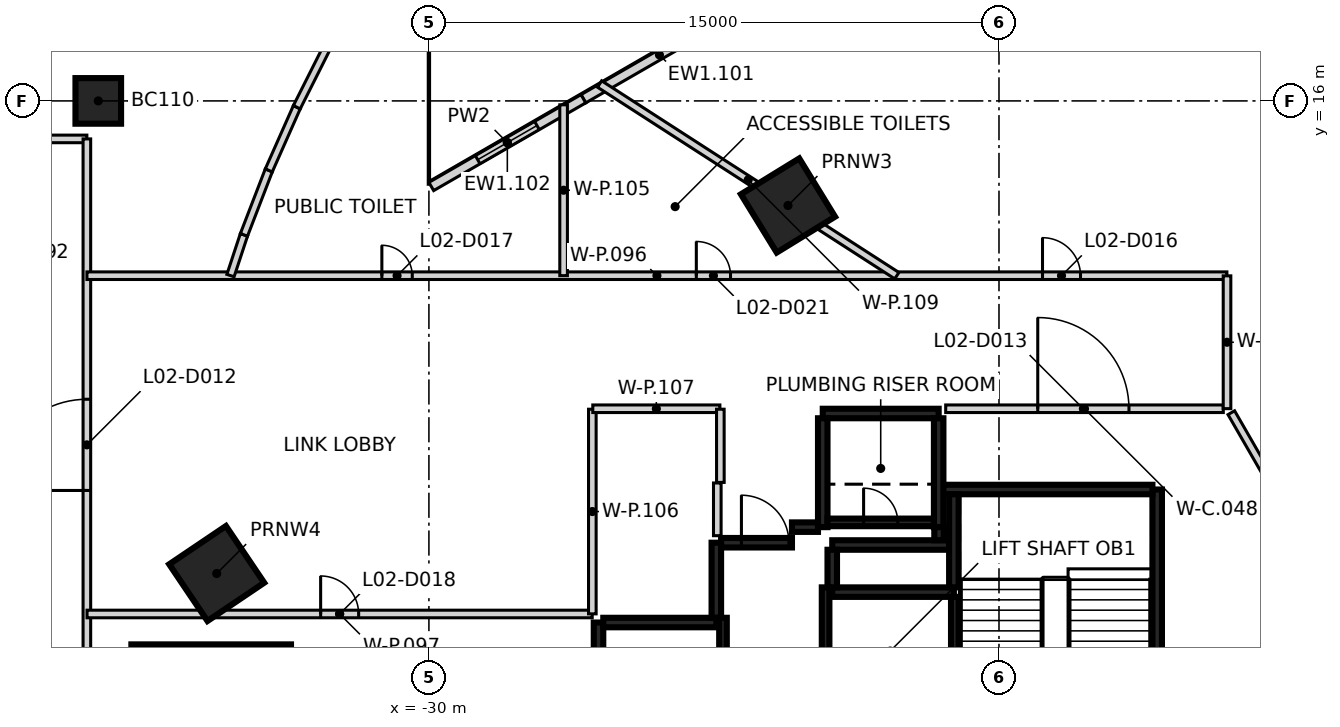
"""IFC4 building model, lengths in metres.
Left out: names, types, materials, properties, quantities, classifications, styles, units other than length and angle.
Written with IfcOpenShell. Run it as: python <this file> out.ifc"""

import sys

from ifc_helpers import new_model, si_unit, direction, frame, frame_2d, origin, origin_2d, place, context, subcontext, project, spatial, rectangle, extrude, element, fill, save


model = new_model("IFC4")
c1 = context("Model", 3, precision=1e-05, world=origin(), true_north=direction((0.0, 1.0)))
c2 = subcontext(c1, "Body", "Model", "MODEL_VIEW")
j1 = project(units=[si_unit("LENGTHUNIT", "METRE"), si_unit("PLANEANGLEUNIT", "RADIAN")], contexts=[c1])
p1 = place(None, origin())
s1 = spatial("IfcSite", under=j1, at=p1, CompositionType="ELEMENT")
p2 = place(p1, origin())
s2 = spatial("IfcBuilding", under=s1, at=p2, CompositionType="ELEMENT")
p3 = place(p2, frame((0.0, 0.0, 14.0)))
s3 = spatial("IfcBuildingStorey", under=s2, at=p3, CompositionType="ELEMENT", Elevation=14.0)
p4 = place(p3, frame((-35.729, 0.0, -0.35), z_axis=(0.0, 0.0, 1.0), x_axis=(1.0, 0.0, 0.0)))
e1 = element("IfcColumn", 1, at=p4, inside=s3, PredefinedType="COLUMN", context=c2, shape_type="SweptSolid", body=[
    extrude(rectangle(XDim=4.2, YDim=3.4, at=origin_2d()), origin(), (0.0, 0.0, 1.0), 5.5),
])
for number, where, z_axis, x_axis in (
    (2, (-20.552, 13.248, -0.35), (0.0, 0.0, 1.0), (-0.523, 0.852, 0.0)),
    (3, (-35.583, 3.565, -0.35), (0.0, 0.0, 1.0), (-0.559, 0.829, 0.0)),
):
    element("IfcColumn", number, at=place(p3, frame(where, z_axis=z_axis, x_axis=x_axis)), inside=s3, PredefinedType="COLUMN", context=c2, shape_type="SweptSolid", body=[
        extrude(rectangle(XDim=1.8, YDim=1.8, at=origin_2d()), origin(), (0.0, 0.0, 1.0), 3.1),
    ])
p5 = place(p3, frame((-38.7, 16.0, -0.35), z_axis=(0.0, 0.0, 1.0), x_axis=(1.0, 0.0, 0.0)))
e4 = element("IfcColumn", 4, at=p5, inside=s3, PredefinedType="COLUMN", context=c2, shape_type="SweptSolid", body=[
    extrude(rectangle(XDim=1.2, YDim=1.2, at=origin_2d()), origin(), (0.0, 0.0, 1.0), 5.5),
])
p6 = place(p3, frame((-25.936, 16.057, 0.0), z_axis=(0.0, 0.0, 1.0), x_axis=(0.866216377649, 0.499669077583, 0.0)))
e5 = element("IfcWall", 5, at=p6, inside=s3, PredefinedType="SOLIDWALL", context=c2, shape_type="SweptSolid", body=[
    extrude(rectangle(XDim=4.62, YDim=0.25, at=frame_2d((2.31, 0.0))), origin(), (0.0, 0.0, 1.0), 5.15),
])
p7 = place(p3, frame((-29.938, 13.748, 0.0), z_axis=(0.0, 0.0, 1.0), x_axis=(0.866193503994, 0.4997087288, 0.0)))
e6 = element("IfcWall", 6, at=p7, inside=s3, PredefinedType="SOLIDWALL", context=c2, shape_type="SweptSolid", body=[
    extrude(rectangle(XDim=4.62, YDim=0.25, at=frame_2d((2.31, 0.0))), origin(), (0.0, 0.0, 1.0), 5.15),
])
p8 = place(p7, frame((1.41, 0.0, 1.1)))
e7 = element("IfcOpeningElement", 7, at=p8, cuts=e6, PredefinedType="OPENING", context=c2, shape_type="SweptSolid", body=[
    extrude(rectangle(XDim=1.8, YDim=1.5, at=frame_2d((0.9, 0.75))), frame((0.0, 0.135, 0.0), z_axis=(0.0, -1.0, 0.0), x_axis=(1.0, 0.0, 0.0)), (0.0, 0.0, 1.0), 0.27),
])
p9 = place(p3, frame((-10.837, 5.775, 0.0), z_axis=(0.0, 0.0, 1.0), x_axis=(0.0, -1.0, 0.0)))
e8 = element("IfcWall", 8, at=p9, inside=s3, PredefinedType="SHEAR", context=c2, shape_type="SweptSolid", body=[
    extrude(rectangle(XDim=11.55, YDim=0.25, at=frame_2d((5.775, 0.0))), origin(), (0.0, 0.0, 1.0), 5.15),
])
p10 = place(p9, frame((10.025, 0.0, 0.0)))
e9 = element("IfcOpeningElement", 9, at=p10, cuts=e8, PredefinedType="OPENING", context=c2, shape_type="SweptSolid", body=[
    extrude(rectangle(XDim=1.2, YDim=2.1, at=frame_2d((0.6, 1.05))), frame((0.0, 0.135, 0.0), z_axis=(0.0, -1.0, 0.0), x_axis=(1.0, 0.0, 0.0)), (0.0, 0.0, 1.0), 0.27),
])
p11 = place(p9, frame((8.725, 0.0, 0.0)))
e10 = element("IfcOpeningElement", 10, at=p11, cuts=e8, PredefinedType="OPENING", context=c2, shape_type="SweptSolid", body=[
    extrude(rectangle(XDim=1.2, YDim=2.1, at=frame_2d((0.6, 1.05))), frame((0.0, 0.135, 0.0), z_axis=(0.0, -1.0, 0.0), x_axis=(1.0, 0.0, 0.0)), (0.0, 0.0, 1.0), 0.27),
])
p12 = place(p3, frame((-25.537, -3.575, 0.0), z_axis=(0.0, 0.0, 1.0), x_axis=(0.0, 1.0, 0.0)))
e11 = element("IfcWall", 11, at=p12, inside=s3, PredefinedType="SHEAR", context=c2, shape_type="SweptSolid", body=[
    extrude(rectangle(XDim=5.85, YDim=0.25, at=frame_2d((2.925, 0.0))), origin(), (0.0, 0.0, 1.0), 5.15),
])
p13 = place(p3, frame((-16.472, 5.775, 0.0), z_axis=(0.0, 0.0, 1.0), x_axis=(1.0, 0.0, 0.0)))
e12 = element("IfcWall", 12, at=p13, inside=s3, PredefinedType="SHEAR", context=c2, shape_type="SweptSolid", body=[
    extrude(rectangle(XDim=5.51, YDim=0.25, at=frame_2d((2.755, 0.0))), origin(), (0.0, 0.0, 1.0), 5.15),
])
p14 = place(p3, frame((-19.387, 3.075, 0.0), z_axis=(0.0, 0.0, 1.0), x_axis=(1.0, 0.0, 0.0)))
e13 = element("IfcWall", 13, at=p14, inside=s3, PredefinedType="SHEAR", context=c2, shape_type="SweptSolid", body=[
    extrude(rectangle(XDim=3.2, YDim=0.25, at=frame_2d((1.6, 0.0))), origin(), (0.0, 0.0, 1.0), 5.15),
])
p15 = place(p3, frame((-25.412, 2.275, 0.0), z_axis=(0.0, 0.0, 1.0), x_axis=(1.0, 0.0, 0.0)))
e14 = element("IfcWall", 14, at=p15, inside=s3, PredefinedType="SHEAR", context=c2, shape_type="SweptSolid", body=[
    extrude(rectangle(XDim=2.975, YDim=0.25, at=frame_2d((1.487, 0.0))), origin(), (0.0, 0.0, 1.0), 5.15),
])
p16 = place(p3, frame((-19.637, 7.775, 0.0), z_axis=(0.0, 0.0, 1.0), x_axis=(1.0, 0.0, 0.0)))
e15 = element("IfcWall", 15, at=p16, inside=s3, PredefinedType="SHEAR", context=c2, shape_type="SweptSolid", body=[
    extrude(rectangle(XDim=3.05, YDim=0.25, at=frame_2d((1.525, 0.0))), origin(), (0.0, 0.0, 1.0), 5.15),
])
for number, where, z_axis, x_axis in (
    (16, (-16.587, 7.65, 0.0), (0.0, 0.0, 1.0), (0.0, -1.0, 0.0)),
    (17, (-19.637, 4.785, 0.0), (0.0, 0.0, 1.0), (0.0, 1.0, 0.0)),
):
    element("IfcWall", number, at=place(p3, frame(where, z_axis=z_axis, x_axis=x_axis)), inside=s3, PredefinedType="SHEAR", context=c2, shape_type="SweptSolid", body=[
        extrude(rectangle(XDim=2.865, YDim=0.25, at=frame_2d((1.432, 0.0))), origin(), (0.0, 0.0, 1.0), 5.15),
    ])
p17 = place(p3, frame((-16.302, 4.315, 0.0), z_axis=(0.0, 0.0, 1.0), x_axis=(-1.0, 0.0, 0.0)))
e18 = element("IfcWall", 18, at=p17, inside=s3, PredefinedType="SHEAR", context=c2, shape_type="SweptSolid", body=[
    extrude(rectangle(XDim=3.085, YDim=0.25, at=frame_2d((1.542, 0.0))), origin(), (0.0, 0.0, 1.0), 5.15),
])
p18 = place(p3, frame((-16.187, 3.2, 0.0), z_axis=(0.0, 0.0, 1.0), x_axis=(0.0, 1.0, 0.0)))
e19 = element("IfcWall", 19, at=p18, inside=s3, PredefinedType="SHEAR", context=c2, shape_type="SweptSolid", body=[
    extrude(rectangle(XDim=2.449, YDim=0.25, at=frame_2d((1.225, 0.0))), origin(), (0.0, 0.0, 1.0), 5.15),
])
p19 = place(p3, frame((-22.437, 2.4, 0.0), z_axis=(0.0, 0.0, 1.0), x_axis=(0.0, 1.0, 0.0)))
e20 = element("IfcWall", 20, at=p19, inside=s3, PredefinedType="SHEAR", context=c2, shape_type="SweptSolid", body=[
    extrude(rectangle(XDim=1.975, YDim=0.25, at=frame_2d((0.987, 0.0))), origin(), (0.0, 0.0, 1.0), 5.15),
])
p20 = place(p3, frame((-22.312, 4.375, 0.0), z_axis=(0.0, 0.0, 1.0), x_axis=(1.0, 0.0, 0.0)))
e21 = element("IfcWall", 21, at=p20, inside=s3, PredefinedType="SHEAR", context=c2, shape_type="SweptSolid", body=[
    extrude(rectangle(XDim=1.865, YDim=0.25, at=frame_2d((0.932, 0.0))), origin(), (0.0, 0.0, 1.0), 5.15),
])
p21 = place(p20, frame((0.535, 0.0, 0.0)))
e22 = element("IfcOpeningElement", 22, at=p21, cuts=e21, PredefinedType="OPENING", context=c2, shape_type="SweptSolid", body=[
    extrude(rectangle(XDim=1.25, YDim=2.1, at=frame_2d((0.625, 1.05))), frame((0.0, 0.135, 0.0), z_axis=(0.0, -1.0, 0.0), x_axis=(1.0, 0.0, 0.0)), (0.0, 0.0, 1.0), 0.27),
])
p22 = place(p3, frame((-19.387, 4.19, 0.0), z_axis=(0.0, 0.0, 1.0), x_axis=(0.0, -1.0, 0.0)))
e23 = element("IfcWall", 23, at=p22, inside=s3, PredefinedType="SHEAR", context=c2, shape_type="SweptSolid", body=[
    extrude(rectangle(XDim=0.989, YDim=0.25, at=frame_2d((0.495, 0.0))), origin(), (0.0, 0.0, 1.0), 5.15),
])
p23 = place(p3, frame((-20.447, 4.785, 0.0), z_axis=(0.0, 0.0, 1.0), x_axis=(1.0, 0.0, 0.0)))
e24 = element("IfcWall", 24, at=p23, inside=s3, PredefinedType="SHEAR", context=c2, shape_type="SweptSolid", body=[
    extrude(rectangle(XDim=0.685, YDim=0.25, at=frame_2d((0.342, 0.0))), origin(), (0.0, 0.0, 1.0), 5.15),
])
p24 = place(p3, frame((-16.577, 4.785, 0.0), z_axis=(0.0, 0.0, 1.0), x_axis=(0.0, -1.0, 0.0)))
e25 = element("IfcWall", 25, at=p24, inside=s3, PredefinedType="SHEAR", context=c2, shape_type="SweptSolid", body=[
    extrude(rectangle(XDim=0.344, YDim=0.25, at=frame_2d((0.172, 0.0))), origin(), (0.0, 0.0, 1.0), 5.15),
])
p25 = place(p3, frame((-16.162, 2.951, 0.0), z_axis=(0.0, 0.0, 1.0), x_axis=(0.0, -1.0, 0.0)))
e26 = element("IfcWall", 26, at=p25, inside=s3, PredefinedType="SHEAR", context=c2, shape_type="SweptSolid", body=[
    extrude(rectangle(XDim=5.851, YDim=0.2, at=frame_2d((2.925, 0.0))), origin(), (0.0, 0.0, 1.0), 5.15),
])
for number, where, z_axis, x_axis in (
    (27, (-19.562, -2.9, 0.0), (0.0, 0.0, 1.0), (0.0, 1.0, 0.0)),
    (28, (-22.262, 2.4, 0.0), (0.0, 0.0, 1.0), (0.0, -1.0, 0.0)),
):
    element("IfcWall", number, at=place(p3, frame(where, z_axis=z_axis, x_axis=x_axis)), inside=s3, PredefinedType="SHEAR", context=c2, shape_type="SweptSolid", body=[
        extrude(rectangle(XDim=6.1, YDim=0.2, at=frame_2d((3.05, 0.0))), origin(), (0.0, 0.0, 1.0), 5.15),
    ])
p26 = place(p3, frame((-19.511, 4.91, 0.0), z_axis=(0.0, 0.0, 1.0), x_axis=(1.0, 0.0, 0.0)))
e29 = element("IfcWall", 29, at=p26, inside=s3, PredefinedType="SHEAR", context=c2, shape_type="SweptSolid", body=[
    extrude(rectangle(XDim=2.798, YDim=0.2, at=frame_2d((1.399, 0.0))), origin(), (0.0, 0.0, 1.0), 5.15),
])
p27 = place(p26, frame((0.949, 0.0, 0.0)))
e30 = element("IfcOpeningElement", 30, at=p27, cuts=e29, PredefinedType="OPENING", context=c2, shape_type="SweptSolid", body=[
    extrude(rectangle(XDim=0.9, YDim=2.1, at=frame_2d((0.45, 1.05))), frame((0.0, 0.11, 0.0), z_axis=(0.0, -1.0, 0.0), x_axis=(1.0, 0.0, 0.0)), (0.0, 0.0, 1.0), 0.22),
])
p28 = place(p3, frame((-16.402, 7.9, 0.0), z_axis=(0.0, 0.0, 1.0), x_axis=(1.0, 0.0, 0.0)))
e31 = element("IfcWall", 31, at=p28, inside=s3, PredefinedType="PARTITIONING", context=c2, shape_type="SweptSolid", body=[
    extrude(rectangle(XDim=7.304, YDim=0.2, at=frame_2d((3.652, 0.0))), origin(), (0.0, 0.0, 1.0), 5.15),
])
p29 = place(p28, frame((2.422, 0.0, 0.0)))
e32 = element("IfcOpeningElement", 32, at=p29, cuts=e31, PredefinedType="OPENING", context=c2, shape_type="SweptSolid", body=[
    extrude(rectangle(XDim=2.4, YDim=2.1, at=frame_2d((1.2, 1.05))), frame((0.0, 0.11, 0.0), z_axis=(0.0, -1.0, 0.0), x_axis=(1.0, 0.0, 0.0)), (0.0, 0.0, 1.0), 0.22),
])
p30 = place(p3, frame((-8.887, 7.796, 0.0), z_axis=(0.0, 0.0, 1.0), x_axis=(0.499310200174, -0.866423293779, 0.0)))
e33 = element("IfcWall", 33, at=p30, inside=s3, PredefinedType="PARTITIONING", context=c2, shape_type="SweptSolid", body=[
    extrude(rectangle(XDim=2.683, YDim=0.2, at=frame_2d((1.342, 0.0))), origin(), (0.0, 0.0, 1.0), 5.15),
])
p31 = place(p3, frame((-42.998, 15.0, 0.0), z_axis=(0.0, 0.0, 1.0), x_axis=(1.0, 0.0, 0.0)))
e34 = element("IfcWall", 34, at=p31, inside=s3, PredefinedType="PARTITIONING", context=c2, shape_type="SweptSolid", body=[
    extrude(rectangle(XDim=3.998, YDim=0.2, at=frame_2d((1.999, 0.0))), origin(), (0.0, 0.0, 1.0), 5.15),
])
p32 = place(p3, frame((-39.0, -15.0, 0.0), z_axis=(0.0, 0.0, 1.0), x_axis=(0.0, 1.0, 0.0)))
e35 = element("IfcWall", 35, at=p32, inside=s3, PredefinedType="PARTITIONING", context=c2, shape_type="SweptSolid", body=[
    extrude(rectangle(XDim=30.0, YDim=0.2, at=frame_2d((15.0, 0.0))), origin(), (0.0, 0.0, 1.0), 5.15),
])
p33 = place(p32, frame((20.75, 0.0, 0.0)))
e36 = element("IfcOpeningElement", 36, at=p33, cuts=e35, PredefinedType="OPENING", context=c2, shape_type="SweptSolid", body=[
    extrude(rectangle(XDim=2.4, YDim=2.1, at=frame_2d((1.2, 1.05))), frame((0.0, 0.11, 0.0), z_axis=(0.0, -1.0, 0.0), x_axis=(1.0, 0.0, 0.0)), (0.0, 0.0, 1.0), 0.22),
])
p34 = place(p3, frame((-38.998, 11.401, 0.0), z_axis=(0.0, 0.0, 1.0), x_axis=(1.0, 0.0, 0.0)))
e37 = element("IfcWall", 37, at=p34, inside=s3, PredefinedType="PARTITIONING", context=c2, shape_type="SweptSolid", body=[
    extrude(rectangle(XDim=29.995, YDim=0.2, at=frame_2d((14.998, 0.0))), origin(), (0.0, 0.0, 1.0), 2.75),
])
p35 = place(p34, frame((25.143, 0.0, 0.0)))
e38 = element("IfcOpeningElement", 38, at=p35, cuts=e37, PredefinedType="OPENING", context=c2, shape_type="SweptSolid", body=[
    extrude(rectangle(XDim=1.0, YDim=2.1, at=frame_2d((0.5, 1.05))), frame((0.0, 0.11, 0.0), z_axis=(0.0, -1.0, 0.0), x_axis=(1.0, 0.0, 0.0)), (0.0, 0.0, 1.0), 0.22),
])
p36 = place(p34, frame((7.76, 0.0, 0.0)))
e39 = element("IfcOpeningElement", 39, at=p36, cuts=e37, PredefinedType="OPENING", context=c2, shape_type="SweptSolid", body=[
    extrude(rectangle(XDim=0.8, YDim=2.1, at=frame_2d((0.4, 1.05))), frame((0.0, 0.11, 0.0), z_axis=(0.0, -1.0, 0.0), x_axis=(1.0, 0.0, 0.0)), (0.0, 0.0, 1.0), 0.22),
])
p37 = place(p34, frame((16.034, 0.0, 0.0)))
e40 = element("IfcOpeningElement", 40, at=p37, cuts=e37, PredefinedType="OPENING", context=c2, shape_type="SweptSolid", body=[
    extrude(rectangle(XDim=0.9, YDim=2.1, at=frame_2d((0.45, 1.05))), frame((0.0, 0.11, 0.0), z_axis=(0.0, -1.0, 0.0), x_axis=(1.0, 0.0, 0.0)), (0.0, 0.0, 1.0), 0.22),
])
p38 = place(p3, frame((-38.995, 2.5, 0.0), z_axis=(0.0, 0.0, 1.0), x_axis=(1.0, 0.0, 0.0)))
e41 = element("IfcWall", 41, at=p38, inside=s3, PredefinedType="PARTITIONING", context=c2, shape_type="SweptSolid", body=[
    extrude(rectangle(XDim=13.292, YDim=0.2, at=frame_2d((6.646, 0.0))), origin(), (0.0, 0.0, 1.0), 5.15),
])
p39 = place(p38, frame((6.146, 0.0, 0.0)))
e42 = element("IfcOpeningElement", 42, at=p39, cuts=e41, PredefinedType="OPENING", context=c2, shape_type="SweptSolid", body=[
    extrude(rectangle(XDim=1.0, YDim=2.1, at=frame_2d((0.5, 1.05))), frame((0.0, 0.11, 0.0), z_axis=(0.0, -1.0, 0.0), x_axis=(1.0, 0.0, 0.0)), (0.0, 0.0, 1.0), 0.22),
])
p40 = place(p3, frame((-35.221, 11.404, 0.0), z_axis=(0.0, 0.0, 1.0), x_axis=(0.313566613152, 0.949566205757, 0.0)))
e43 = element("IfcWall", 43, at=p40, inside=s3, PredefinedType="PARTITIONING", context=c2, shape_type="SweptSolid", body=[
    extrude(rectangle(XDim=1.129, YDim=0.2, at=frame_2d((0.564, 0.0))), origin(), (0.0, 0.0, 1.0), 5.15),
])
for number, where, z_axis, x_axis in (
    (44, (-34.867, 12.476, 0.0), (0.0, 0.0, 1.0), (0.36, 0.933, 0.0)),
    (45, (-34.213, 14.172, 0.0), (0.0, 0.0, 1.0), (0.405, 0.914, 0.0)),
):
    element("IfcWall", number, at=place(p3, frame(where, z_axis=z_axis, x_axis=x_axis)), inside=s3, PredefinedType="PARTITIONING", context=c2, shape_type="SweptSolid", body=[
        extrude(rectangle(XDim=1.818, YDim=0.2, at=frame_2d((0.909, 0.0))), origin(), (0.0, 0.0, 1.0), 5.15),
    ])
p41 = place(p3, frame((-33.476, 15.834, 0.0), z_axis=(0.0, 0.0, 1.0), x_axis=(0.449684007343, 0.893187714615, 0.0)))
e46 = element("IfcWall", 46, at=p41, inside=s3, PredefinedType="PARTITIONING", context=c2, shape_type="SweptSolid", body=[
    extrude(rectangle(XDim=1.817, YDim=0.2, at=frame_2d((0.909, 0.0))), origin(), (0.0, 0.0, 1.0), 5.15),
])
p42 = place(p3, frame((-26.456, 11.402, 0.0), z_axis=(0.0, 0.0, 1.0), x_axis=(0.0, 1.0, 0.0)))
e47 = element("IfcWall", 47, at=p42, inside=s3, PredefinedType="PARTITIONING", context=c2, shape_type="SweptSolid", body=[
    extrude(rectangle(XDim=4.495, YDim=0.2, at=frame_2d((2.248, 0.0))), origin(), (0.0, 0.0, 1.0), 5.15),
])
p43 = place(p3, frame((-25.7, 2.503, 0.0), z_axis=(0.0, 0.0, 1.0), x_axis=(0.0, 1.0, 0.0)))
e48 = element("IfcWall", 48, at=p43, inside=s3, PredefinedType="PARTITIONING", context=c2, shape_type="SweptSolid", body=[
    extrude(rectangle(XDim=5.385, YDim=0.2, at=frame_2d((2.692, 0.0))), origin(), (0.0, 0.0, 1.0), 5.15),
])
p44 = place(p3, frame((-25.688, 7.9, 0.0), z_axis=(0.0, 0.0, 1.0), x_axis=(1.0, 0.0, 0.0)))
e49 = element("IfcWall", 49, at=p44, inside=s3, PredefinedType="PARTITIONING", context=c2, shape_type="SweptSolid", body=[
    extrude(rectangle(XDim=3.344, YDim=0.2, at=frame_2d((1.672, 0.0))), origin(), (0.0, 0.0, 1.0), 5.15),
])
p45 = place(p3, frame((-25.509, 16.444, 0.0), z_axis=(0.0, 0.0, 1.0), x_axis=(0.840484744403, -0.541835209659, 0.0)))
e50 = element("IfcWall", 50, at=p45, inside=s3, PredefinedType="PARTITIONING", context=c2, shape_type="SweptSolid", body=[
    extrude(rectangle(XDim=9.305, YDim=0.2, at=frame_2d((4.653, 0.0))), origin(), (0.0, 0.0, 1.0), 2.75),
])
p46 = place(p3, frame((-22.412, 4.56, 0.0), z_axis=(0.0, 0.0, 1.0), x_axis=(0.0, 1.0, 0.0)))
e51 = element("IfcWall", 51, at=p46, inside=s3, PredefinedType="PARTITIONING", context=c2, shape_type="SweptSolid", body=[
    extrude(rectangle(XDim=1.387, YDim=0.2, at=frame_2d((0.693, 0.0))), origin(), (0.0, 0.0, 1.0), 5.15),
])
p47 = place(p3, frame((-22.332, 7.888, 0.0), z_axis=(0.0, 0.0, 1.0), x_axis=(0.000507035047, -0.999999871458, 0.0)))
e52 = element("IfcWall", 52, at=p47, inside=s3, PredefinedType="PARTITIONING", context=c2, shape_type="SweptSolid", body=[
    extrude(rectangle(XDim=1.926, YDim=0.2, at=frame_2d((0.963, 0.0))), origin(), (0.0, 0.0, 1.0), 5.15),
])
p48 = place(p3, frame((-9.0, 7.903, 0.0), z_axis=(0.0, 0.0, 1.0), x_axis=(0.0, 1.0, 0.0)))
e53 = element("IfcWall", 53, at=p48, inside=s3, PredefinedType="PARTITIONING", context=c2, shape_type="SweptSolid", body=[
    extrude(rectangle(XDim=3.494, YDim=0.2, at=frame_2d((1.747, 0.0))), origin(), (0.0, 0.0, 1.0), 5.15),
])
p49 = place(p8, origin())
e54 = element("IfcWindow", 54, at=p49, inside=s3, PartitioningType="SINGLE_PANEL", PredefinedType="WINDOW", context=c2, shape_type="SweptSolid", body=[
    extrude(rectangle(XDim=1.8, YDim=1.5, at=frame_2d((0.9, 0.75))), frame((0.0, 0.03, 0.0), z_axis=(0.0, -1.0, 0.0), x_axis=(1.0, 0.0, 0.0)), (0.0, 0.0, 1.0), 0.06),
])
fill(e7, e54)
p50 = place(p21, origin())
e55 = element("IfcDoor", 55, at=p50, inside=s3, OperationType="SINGLE_SWING_LEFT", PredefinedType="DOOR", context=c2, shape_type="SweptSolid", body=[
    extrude(rectangle(XDim=1.25, YDim=2.1, at=frame_2d((0.625, 1.05))), frame((0.0, 0.025, 0.0), z_axis=(0.0, -1.0, 0.0), x_axis=(1.0, 0.0, 0.0)), (0.0, 0.0, 1.0), 0.05),
])
fill(e22, e55)
p51 = place(p27, origin())
e56 = element("IfcDoor", 56, at=p51, inside=s3, OperationType="SINGLE_SWING_RIGHT", PredefinedType="DOOR", context=c2, shape_type="SweptSolid", body=[
    extrude(rectangle(XDim=0.9, YDim=2.1, at=frame_2d((0.45, 1.05))), frame((0.0, 0.025, 0.0), z_axis=(0.0, -1.0, 0.0), x_axis=(1.0, 0.0, 0.0)), (0.0, 0.0, 1.0), 0.05),
])
fill(e30, e56)
p52 = place(p33, frame((2.4, 0.0, 0.0), z_axis=(0.0, 0.0, 1.0), x_axis=(-1.0, 0.0, 0.0)))
e57 = element("IfcDoor", 57, at=p52, inside=s3, OperationType="DOUBLE_DOOR_SINGLE_SWING", PredefinedType="DOOR", context=c2, shape_type="SweptSolid", body=[
    extrude(rectangle(XDim=2.4, YDim=2.1, at=frame_2d((1.2, 1.05))), frame((0.0, 0.025, 0.0), z_axis=(0.0, -1.0, 0.0), x_axis=(1.0, 0.0, 0.0)), (0.0, 0.0, 1.0), 0.05),
])
fill(e36, e57)
p53 = place(p29, frame((2.4, 0.0, 0.0), z_axis=(0.0, 0.0, 1.0), x_axis=(-1.0, 0.0, 0.0)))
e58 = element("IfcDoor", 58, at=p53, inside=s3, OperationType="DOUBLE_DOOR_SINGLE_SWING", PredefinedType="DOOR", context=c2, shape_type="SweptSolid", body=[
    extrude(rectangle(XDim=2.4, YDim=2.1, at=frame_2d((1.2, 1.05))), frame((0.0, 0.025, 0.0), z_axis=(0.0, -1.0, 0.0), x_axis=(1.0, 0.0, 0.0)), (0.0, 0.0, 1.0), 0.05),
])
fill(e32, e58)
p54 = place(p35, origin())
e59 = element("IfcDoor", 59, at=p54, inside=s3, OperationType="SINGLE_SWING_LEFT", PredefinedType="DOOR", context=c2, shape_type="SweptSolid", body=[
    extrude(rectangle(XDim=1.0, YDim=2.1, at=frame_2d((0.5, 1.05))), frame((0.0, 0.025, 0.0), z_axis=(0.0, -1.0, 0.0), x_axis=(1.0, 0.0, 0.0)), (0.0, 0.0, 1.0), 0.05),
])
fill(e38, e59)
p55 = place(p36, origin())
e60 = element("IfcDoor", 60, at=p55, inside=s3, OperationType="SINGLE_SWING_LEFT", PredefinedType="DOOR", context=c2, shape_type="SweptSolid", body=[
    extrude(rectangle(XDim=0.8, YDim=2.1, at=frame_2d((0.4, 1.05))), frame((0.0, 0.025, 0.0), z_axis=(0.0, -1.0, 0.0), x_axis=(1.0, 0.0, 0.0)), (0.0, 0.0, 1.0), 0.05),
])
fill(e39, e60)
p56 = place(p39, frame((1.0, 0.0, 0.0), z_axis=(0.0, 0.0, 1.0), x_axis=(-1.0, 0.0, 0.0)))
e61 = element("IfcDoor", 61, at=p56, inside=s3, OperationType="SINGLE_SWING_LEFT", PredefinedType="DOOR", context=c2, shape_type="SweptSolid", body=[
    extrude(rectangle(XDim=1.0, YDim=2.1, at=frame_2d((0.5, 1.05))), frame((0.0, 0.025, 0.0), z_axis=(0.0, -1.0, 0.0), x_axis=(1.0, 0.0, 0.0)), (0.0, 0.0, 1.0), 0.05),
])
fill(e42, e61)
p57 = place(p37, origin())
e62 = element("IfcDoor", 62, at=p57, inside=s3, OperationType="SINGLE_SWING_LEFT", PredefinedType="DOOR", context=c2, shape_type="SweptSolid", body=[
    extrude(rectangle(XDim=0.9, YDim=2.1, at=frame_2d((0.45, 1.05))), frame((0.0, 0.025, 0.0), z_axis=(0.0, -1.0, 0.0), x_axis=(1.0, 0.0, 0.0)), (0.0, 0.0, 1.0), 0.05),
])
fill(e40, e62)
save(model, sys.argv[1])
